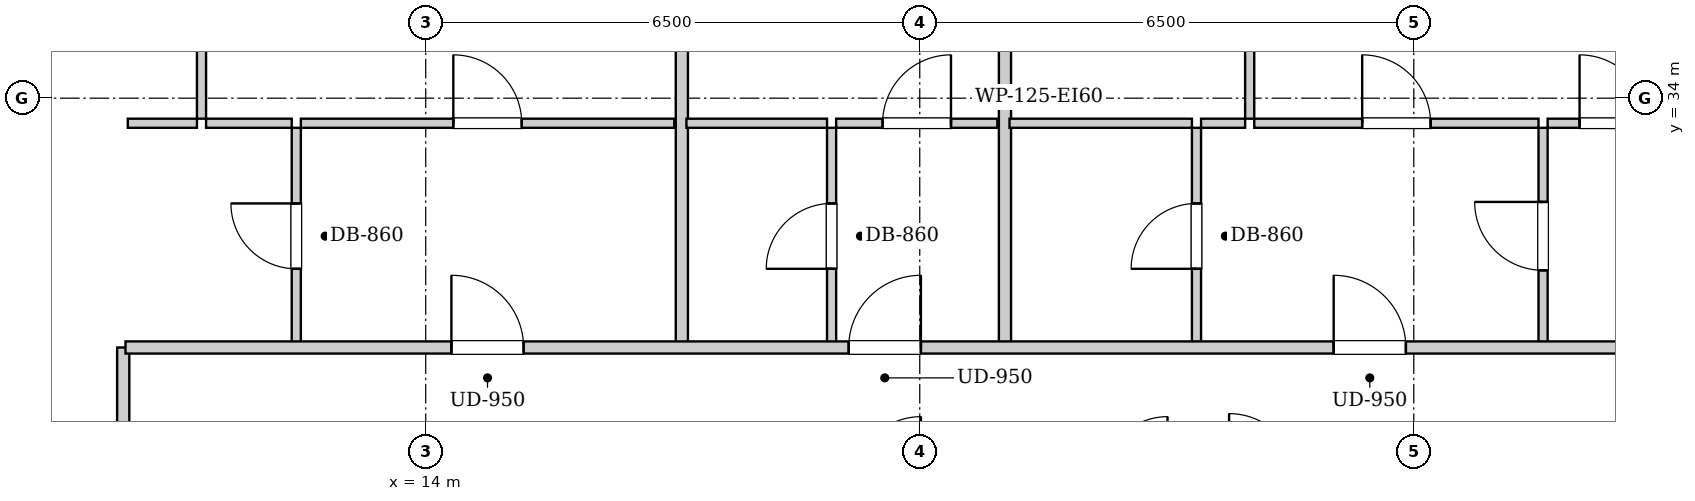
"""IFC4 building model, lengths in metres.
Left out: names, types, materials, properties, quantities, classifications, styles, units other than length and angle.
Written with IfcOpenShell. Run it as: python <this file> out.ifc"""

import sys

from ifc_helpers import new_model, si_unit, direction, frame, frame_2d, origin, place, context, subcontext, project, spatial, rectangle, extrude, element, fill, save


model = new_model("IFC4")
c1 = context("Model", 3, precision=1e-05, world=origin(), true_north=direction((0.0, 1.0)))
c2 = subcontext(c1, "Body", "Model", "MODEL_VIEW")
j1 = project(units=[si_unit("LENGTHUNIT", "METRE"), si_unit("PLANEANGLEUNIT", "RADIAN")], contexts=[c1])
p1 = place(None, origin())
s1 = spatial("IfcSite", under=j1, at=p1, CompositionType="ELEMENT")
p2 = place(p1, origin())
s2 = spatial("IfcBuilding", under=s1, at=p2, CompositionType="ELEMENT")
p3 = place(p2, frame((0.0, 0.0, 163.4)))
s3 = spatial("IfcBuildingStorey", under=s2, at=p3, CompositionType="ELEMENT", Elevation=163.4)
p4 = place(p3, frame((10.02, 28.98, 0.0), z_axis=(0.0, 0.0, 1.0), x_axis=(0.0, 1.0, 0.0)))
e1 = element("IfcWall", 1, at=p4, inside=s3, PredefinedType="PARTITIONING", context=c2, shape_type="SweptSolid", body=[
    extrude(rectangle(XDim=1.74, YDim=0.16, at=frame_2d((0.87, 0.0))), origin(), (0.0, 0.0, 1.0), 2.99),
])
p5 = place(p3, frame((12.297, 30.76, 0.0), z_axis=(0.0, 0.0, 1.0), x_axis=(0.0, 1.0, 0.0)))
e2 = element("IfcWall", 2, at=p5, inside=s3, PredefinedType="PARTITIONING", context=c2, shape_type="SweptSolid", body=[
    extrude(rectangle(XDim=2.85, YDim=0.12, at=frame_2d((1.425, 0.0))), origin(), (0.0, 0.0, 1.0), 2.99),
])
p6 = place(p5, frame((0.995, 0.0, 0.0)))
e3 = element("IfcOpeningElement", 3, at=p6, cuts=e2, PredefinedType="OPENING", context=c2, shape_type="SweptSolid", body=[
    extrude(rectangle(XDim=0.86, YDim=2.05, at=frame_2d((0.43, 1.025))), frame((0.0, 0.07, 0.0), z_axis=(0.0, -1.0, 0.0), x_axis=(1.0, 0.0, 0.0)), (0.0, 0.0, 1.0), 0.14),
])
p7 = place(p3, frame((10.08, 33.67, 0.0), z_axis=(0.0, 0.0, 1.0), x_axis=(1.0, 0.0, 0.0)))
e4 = element("IfcWall", 4, at=p7, inside=s3, PredefinedType="PARTITIONING", context=c2, shape_type="SweptSolid", body=[
    extrude(rectangle(XDim=0.91, YDim=0.12, at=frame_2d((0.455, 0.0))), origin(), (0.0, 0.0, 1.0), 2.99),
])
p8 = place(p3, frame((11.11, 33.67, 0.0), z_axis=(0.0, 0.0, 1.0), x_axis=(1.0, 0.0, 0.0)))
e5 = element("IfcWall", 5, at=p8, inside=s3, PredefinedType="PARTITIONING", context=c2, shape_type="SweptSolid", body=[
    extrude(rectangle(XDim=1.127, YDim=0.12, at=frame_2d((0.563, 0.0))), origin(), (0.0, 0.0, 1.0), 2.99),
])
p9 = place(p3, frame((12.357, 33.67, 0.0), z_axis=(0.0, 0.0, 1.0), x_axis=(1.0, 0.0, 0.0)))
e6 = element("IfcWall", 6, at=p9, inside=s3, PredefinedType="PARTITIONING", context=c2, shape_type="SweptSolid", body=[
    extrude(rectangle(XDim=4.913, YDim=0.12, at=frame_2d((2.457, 0.0))), origin(), (0.0, 0.0, 1.0), 2.99),
])
p10 = place(p9, frame((2.006, 0.0, 0.0)))
e7 = element("IfcOpeningElement", 7, at=p10, cuts=e6, PredefinedType="OPENING", context=c2, shape_type="SweptSolid", body=[
    extrude(rectangle(XDim=0.9, YDim=2.05, at=frame_2d((0.45, 1.025))), frame((0.0, 0.07, 0.0), z_axis=(0.0, -1.0, 0.0), x_axis=(1.0, 0.0, 0.0)), (0.0, 0.0, 1.0), 0.14),
])
p11 = place(p3, frame((11.05, 33.73, 0.0), z_axis=(0.0, 0.0, 1.0), x_axis=(0.0, 1.0, 0.0)))
e8 = element("IfcWall", 8, at=p11, inside=s3, PredefinedType="PARTITIONING", context=c2, shape_type="SweptSolid", body=[
    extrude(rectangle(XDim=9.29, YDim=0.12, at=frame_2d((4.645, 0.0))), origin(), (0.0, 0.0, 1.0), 2.99),
])
p12 = place(p11, frame((4.18, 0.0, 0.0)))
e9 = element("IfcOpeningElement", 9, at=p12, cuts=e8, PredefinedType="OPENING", context=c2, shape_type="SweptSolid", body=[
    extrude(rectangle(XDim=0.9, YDim=2.05, at=frame_2d((0.45, 1.025))), frame((0.0, 0.07, 0.0), z_axis=(0.0, -1.0, 0.0), x_axis=(1.0, 0.0, 0.0)), (0.0, 0.0, 1.0), 0.14),
])
p13 = place(p3, frame((17.37, 30.76, 0.0), z_axis=(0.0, 0.0, 1.0), x_axis=(0.0, 1.0, 0.0)))
e10 = element("IfcWall", 10, at=p13, inside=s3, PredefinedType="PARTITIONING", context=c2, shape_type="SweptSolid", body=[
    extrude(rectangle(XDim=12.26, YDim=0.16, at=frame_2d((6.13, 0.0))), origin(), (0.0, 0.0, 1.0), 2.99),
])
p14 = place(p3, frame((19.34, 30.76, 0.0), z_axis=(0.0, 0.0, 1.0), x_axis=(0.0, 1.0, 0.0)))
e11 = element("IfcWall", 11, at=p14, inside=s3, PredefinedType="PARTITIONING", context=c2, shape_type="SweptSolid", body=[
    extrude(rectangle(XDim=2.85, YDim=0.12, at=frame_2d((1.425, 0.0))), origin(), (0.0, 0.0, 1.0), 2.99),
])
p15 = place(p14, frame((0.995, 0.0, 0.0)))
e12 = element("IfcOpeningElement", 12, at=p15, cuts=e11, PredefinedType="OPENING", context=c2, shape_type="SweptSolid", body=[
    extrude(rectangle(XDim=0.86, YDim=2.05, at=frame_2d((0.43, 1.025))), frame((0.0, 0.07, 0.0), z_axis=(0.0, -1.0, 0.0), x_axis=(1.0, 0.0, 0.0)), (0.0, 0.0, 1.0), 0.14),
])
p16 = place(p3, frame((17.43, 33.67, 0.0), z_axis=(0.0, 0.0, 1.0), x_axis=(1.0, 0.0, 0.0)))
e13 = element("IfcWall", 13, at=p16, inside=s3, PredefinedType="PARTITIONING", context=c2, shape_type="SweptSolid", body=[
    extrude(rectangle(XDim=1.85, YDim=0.12, at=frame_2d((0.925, 0.0))), origin(), (0.0, 0.0, 1.0), 2.99),
])
p17 = place(p3, frame((19.4, 33.67, 0.0), z_axis=(0.0, 0.0, 1.0), x_axis=(1.0, 0.0, 0.0)))
e14 = element("IfcWall", 14, at=p17, inside=s3, PredefinedType="PARTITIONING", context=c2, shape_type="SweptSolid", body=[
    extrude(rectangle(XDim=2.121, YDim=0.12, at=frame_2d((1.061, 0.0))), origin(), (0.0, 0.0, 1.0), 2.99),
])
p18 = place(p17, frame((0.611, 0.0, 0.0)))
e15 = element("IfcOpeningElement", 15, at=p18, cuts=e14, PredefinedType="OPENING", context=c2, shape_type="SweptSolid", body=[
    extrude(rectangle(XDim=0.9, YDim=2.05, at=frame_2d((0.45, 1.025))), frame((0.0, 0.07, 0.0), z_axis=(0.0, -1.0, 0.0), x_axis=(1.0, 0.0, 0.0)), (0.0, 0.0, 1.0), 0.14),
])
p19 = place(p3, frame((21.621, 30.76, 0.0), z_axis=(0.0, 0.0, 1.0), x_axis=(0.0, 1.0, 0.0)))
e16 = element("IfcWall", 16, at=p19, inside=s3, PredefinedType="PARTITIONING", context=c2, shape_type="SweptSolid", body=[
    extrude(rectangle(XDim=12.26, YDim=0.16, at=frame_2d((6.13, 0.0))), origin(), (0.0, 0.0, 1.0), 2.99),
])
p20 = place(p3, frame((24.141, 30.76, 0.0), z_axis=(0.0, 0.0, 1.0), x_axis=(0.0, 1.0, 0.0)))
e17 = element("IfcWall", 17, at=p20, inside=s3, PredefinedType="PARTITIONING", context=c2, shape_type="SweptSolid", body=[
    extrude(rectangle(XDim=2.85, YDim=0.12, at=frame_2d((1.425, 0.0))), origin(), (0.0, 0.0, 1.0), 2.99),
])
p21 = place(p20, frame((0.995, 0.0, 0.0)))
e18 = element("IfcOpeningElement", 18, at=p21, cuts=e17, PredefinedType="OPENING", context=c2, shape_type="SweptSolid", body=[
    extrude(rectangle(XDim=0.86, YDim=2.05, at=frame_2d((0.43, 1.025))), frame((0.0, 0.07, 0.0), z_axis=(0.0, -1.0, 0.0), x_axis=(1.0, 0.0, 0.0)), (0.0, 0.0, 1.0), 0.14),
])
p22 = place(p3, frame((21.681, 33.67, 0.0), z_axis=(0.0, 0.0, 1.0), x_axis=(1.0, 0.0, 0.0)))
e19 = element("IfcWall", 19, at=p22, inside=s3, PredefinedType="PARTITIONING", context=c2, shape_type="SweptSolid", body=[
    extrude(rectangle(XDim=2.4, YDim=0.12, at=frame_2d((1.2, 0.0))), origin(), (0.0, 0.0, 1.0), 2.99),
])
p23 = place(p3, frame((28.701, 30.76, 0.0), z_axis=(0.0, 0.0, 1.0), x_axis=(0.0, 1.0, 0.0)))
e20 = element("IfcWall", 20, at=p23, inside=s3, PredefinedType="PARTITIONING", context=c2, shape_type="SweptSolid", body=[
    extrude(rectangle(XDim=2.85, YDim=0.12, at=frame_2d((1.425, 0.0))), origin(), (0.0, 0.0, 1.0), 2.99),
])
p24 = place(p23, frame((0.975, 0.0, 0.0)))
e21 = element("IfcOpeningElement", 21, at=p24, cuts=e20, PredefinedType="OPENING", context=c2, shape_type="SweptSolid", body=[
    extrude(rectangle(XDim=0.9, YDim=2.05, at=frame_2d((0.45, 1.025))), frame((0.0, 0.07, 0.0), z_axis=(0.0, -1.0, 0.0), x_axis=(1.0, 0.0, 0.0)), (0.0, 0.0, 1.0), 0.14),
])
p25 = place(p3, frame((24.201, 33.67, 0.0), z_axis=(0.0, 0.0, 1.0), x_axis=(1.0, 0.0, 0.0)))
e22 = element("IfcWall", 22, at=p25, inside=s3, PredefinedType="PARTITIONING", context=c2, shape_type="SweptSolid", body=[
    extrude(rectangle(XDim=0.58, YDim=0.12, at=frame_2d((0.29, 0.0))), origin(), (0.0, 0.0, 1.0), 2.99),
])
p26 = place(p3, frame((24.901, 33.67, 0.0), z_axis=(0.0, 0.0, 1.0), x_axis=(1.0, 0.0, 0.0)))
e23 = element("IfcWall", 23, at=p26, inside=s3, PredefinedType="PARTITIONING", context=c2, shape_type="SweptSolid", body=[
    extrude(rectangle(XDim=3.74, YDim=0.12, at=frame_2d((1.87, 0.0))), origin(), (0.0, 0.0, 1.0), 2.99),
])
p27 = place(p26, frame((1.42, 0.0, 0.0)))
e24 = element("IfcOpeningElement", 24, at=p27, cuts=e23, PredefinedType="OPENING", context=c2, shape_type="SweptSolid", body=[
    extrude(rectangle(XDim=0.9, YDim=2.05, at=frame_2d((0.45, 1.025))), frame((0.0, 0.07, 0.0), z_axis=(0.0, -1.0, 0.0), x_axis=(1.0, 0.0, 0.0)), (0.0, 0.0, 1.0), 0.14),
])
p28 = place(p3, frame((28.761, 33.67, 0.0), z_axis=(0.0, 0.0, 1.0), x_axis=(1.0, 0.0, 0.0)))
e25 = element("IfcWall", 25, at=p28, inside=s3, PredefinedType="PARTITIONING", context=c2, shape_type="SweptSolid", body=[
    extrude(rectangle(XDim=1.739, YDim=0.12, at=frame_2d((0.87, 0.0))), origin(), (0.0, 0.0, 1.0), 2.99),
])
p29 = place(p28, frame((0.42, 0.0, 0.0)))
e26 = element("IfcOpeningElement", 26, at=p29, cuts=e25, PredefinedType="OPENING", context=c2, shape_type="SweptSolid", body=[
    extrude(rectangle(XDim=0.9, YDim=2.05, at=frame_2d((0.45, 1.025))), frame((0.0, 0.07, 0.0), z_axis=(0.0, -1.0, 0.0), x_axis=(1.0, 0.0, 0.0)), (0.0, 0.0, 1.0), 0.14),
])
p30 = place(p3, frame((24.841, 33.73, 0.0), z_axis=(0.0, 0.0, 1.0), x_axis=(0.0, 1.0, 0.0)))
e27 = element("IfcWall", 27, at=p30, inside=s3, PredefinedType="PARTITIONING", context=c2, shape_type="SweptSolid", body=[
    extrude(rectangle(XDim=9.29, YDim=0.12, at=frame_2d((4.645, 0.0))), origin(), (0.0, 0.0, 1.0), 2.99),
])
p31 = place(p30, frame((4.18, 0.0, 0.0)))
e28 = element("IfcOpeningElement", 28, at=p31, cuts=e27, PredefinedType="OPENING", context=c2, shape_type="SweptSolid", body=[
    extrude(rectangle(XDim=0.9, YDim=2.05, at=frame_2d((0.45, 1.025))), frame((0.0, 0.07, 0.0), z_axis=(0.0, -1.0, 0.0), x_axis=(1.0, 0.0, 0.0)), (0.0, 0.0, 1.0), 0.14),
])
p32 = place(p3, frame((10.05, 30.72, 0.0), z_axis=(0.0, 0.0, 1.0), x_axis=(1.0, 0.0, 0.0)))
e29 = element("IfcWall", 29, at=p32, inside=s3, PredefinedType="PARTITIONING", context=c2, shape_type="SweptSolid", body=[
    extrude(rectangle(XDim=27.7, YDim=0.16, at=frame_2d((13.85, 0.0))), origin(), (0.0, 0.0, 1.0), 2.99),
])
p33 = place(p32, frame((4.288, 0.0, 0.0)))
e30 = element("IfcOpeningElement", 30, at=p33, cuts=e29, PredefinedType="OPENING", context=c2, shape_type="SweptSolid", body=[
    extrude(rectangle(XDim=0.95, YDim=2.1, at=frame_2d((0.475, 1.05))), frame((0.0, 0.09, 0.0), z_axis=(0.0, -1.0, 0.0), x_axis=(1.0, 0.0, 0.0)), (0.0, 0.0, 1.0), 0.18),
])
p34 = place(p32, frame((9.515, 0.0, 0.0)))
e31 = element("IfcOpeningElement", 31, at=p34, cuts=e29, PredefinedType="OPENING", context=c2, shape_type="SweptSolid", body=[
    extrude(rectangle(XDim=0.95, YDim=2.1, at=frame_2d((0.475, 1.05))), frame((0.0, 0.09, 0.0), z_axis=(0.0, -1.0, 0.0), x_axis=(1.0, 0.0, 0.0)), (0.0, 0.0, 1.0), 0.18),
])
p35 = place(p32, frame((15.896, 0.0, 0.0)))
e32 = element("IfcOpeningElement", 32, at=p35, cuts=e29, PredefinedType="OPENING", context=c2, shape_type="SweptSolid", body=[
    extrude(rectangle(XDim=0.95, YDim=2.1, at=frame_2d((0.475, 1.05))), frame((0.0, 0.09, 0.0), z_axis=(0.0, -1.0, 0.0), x_axis=(1.0, 0.0, 0.0)), (0.0, 0.0, 1.0), 0.18),
])
p36 = place(p32, frame((25.925, 0.0, 0.0)))
e33 = element("IfcOpeningElement", 33, at=p36, cuts=e29, PredefinedType="OPENING", context=c2, shape_type="SweptSolid", body=[
    extrude(rectangle(XDim=0.95, YDim=2.1, at=frame_2d((0.475, 1.05))), frame((0.0, 0.09, 0.0), z_axis=(0.0, -1.0, 0.0), x_axis=(1.0, 0.0, 0.0)), (0.0, 0.0, 1.0), 0.18),
])
p37 = place(p6, origin())
e34 = element("IfcDoor", 34, at=p37, inside=s3, OperationType="SINGLE_SWING_RIGHT", PredefinedType="DOOR", context=c2, shape_type="SweptSolid", body=[
    extrude(rectangle(XDim=0.86, YDim=2.05, at=frame_2d((0.43, 1.025))), frame((0.0, 0.025, 0.0), z_axis=(0.0, -1.0, 0.0), x_axis=(1.0, 0.0, 0.0)), (0.0, 0.0, 1.0), 0.05),
])
fill(e3, e34)
p38 = place(p10, origin())
e35 = element("IfcDoor", 35, at=p38, inside=s3, OperationType="SINGLE_SWING_LEFT", PredefinedType="DOOR", context=c2, shape_type="SweptSolid", body=[
    extrude(rectangle(XDim=0.9, YDim=2.05, at=frame_2d((0.45, 1.025))), frame((0.0, 0.025, 0.0), z_axis=(0.0, -1.0, 0.0), x_axis=(1.0, 0.0, 0.0)), (0.0, 0.0, 1.0), 0.05),
])
fill(e7, e35)
p39 = place(p15, origin())
e36 = element("IfcDoor", 36, at=p39, inside=s3, OperationType="SINGLE_SWING_LEFT", PredefinedType="DOOR", context=c2, shape_type="SweptSolid", body=[
    extrude(rectangle(XDim=0.86, YDim=2.05, at=frame_2d((0.43, 1.025))), frame((0.0, 0.025, 0.0), z_axis=(0.0, -1.0, 0.0), x_axis=(1.0, 0.0, 0.0)), (0.0, 0.0, 1.0), 0.05),
])
fill(e12, e36)
p40 = place(p18, origin())
e37 = element("IfcDoor", 37, at=p40, inside=s3, OperationType="SINGLE_SWING_RIGHT", PredefinedType="DOOR", context=c2, shape_type="SweptSolid", body=[
    extrude(rectangle(XDim=0.9, YDim=2.05, at=frame_2d((0.45, 1.025))), frame((0.0, 0.025, 0.0), z_axis=(0.0, -1.0, 0.0), x_axis=(1.0, 0.0, 0.0)), (0.0, 0.0, 1.0), 0.05),
])
fill(e15, e37)
p41 = place(p21, origin())
e38 = element("IfcDoor", 38, at=p41, inside=s3, OperationType="SINGLE_SWING_LEFT", PredefinedType="DOOR", context=c2, shape_type="SweptSolid", body=[
    extrude(rectangle(XDim=0.86, YDim=2.05, at=frame_2d((0.43, 1.025))), frame((0.0, 0.025, 0.0), z_axis=(0.0, -1.0, 0.0), x_axis=(1.0, 0.0, 0.0)), (0.0, 0.0, 1.0), 0.05),
])
fill(e18, e38)
p42 = place(p24, origin())
e39 = element("IfcDoor", 39, at=p42, inside=s3, OperationType="SINGLE_SWING_RIGHT", PredefinedType="DOOR", context=c2, shape_type="SweptSolid", body=[
    extrude(rectangle(XDim=0.9, YDim=2.05, at=frame_2d((0.45, 1.025))), frame((0.0, 0.025, 0.0), z_axis=(0.0, -1.0, 0.0), x_axis=(1.0, 0.0, 0.0)), (0.0, 0.0, 1.0), 0.05),
])
fill(e21, e39)
p43 = place(p27, origin())
e40 = element("IfcDoor", 40, at=p43, inside=s3, OperationType="SINGLE_SWING_LEFT", PredefinedType="DOOR", context=c2, shape_type="SweptSolid", body=[
    extrude(rectangle(XDim=0.9, YDim=2.05, at=frame_2d((0.45, 1.025))), frame((0.0, 0.025, 0.0), z_axis=(0.0, -1.0, 0.0), x_axis=(1.0, 0.0, 0.0)), (0.0, 0.0, 1.0), 0.05),
])
fill(e24, e40)
p44 = place(p29, origin())
e41 = element("IfcDoor", 41, at=p44, inside=s3, OperationType="SINGLE_SWING_LEFT", PredefinedType="DOOR", context=c2, shape_type="SweptSolid", body=[
    extrude(rectangle(XDim=0.9, YDim=2.05, at=frame_2d((0.45, 1.025))), frame((0.0, 0.025, 0.0), z_axis=(0.0, -1.0, 0.0), x_axis=(1.0, 0.0, 0.0)), (0.0, 0.0, 1.0), 0.05),
])
fill(e26, e41)
p45 = place(p33, origin())
e42 = element("IfcDoor", 42, at=p45, inside=s3, OperationType="SINGLE_SWING_LEFT", PredefinedType="DOOR", context=c2, shape_type="SweptSolid", body=[
    extrude(rectangle(XDim=0.95, YDim=2.1, at=frame_2d((0.475, 1.05))), frame((0.0, 0.025, 0.0), z_axis=(0.0, -1.0, 0.0), x_axis=(1.0, 0.0, 0.0)), (0.0, 0.0, 1.0), 0.05),
])
fill(e30, e42)
p46 = place(p34, origin())
e43 = element("IfcDoor", 43, at=p46, inside=s3, OperationType="SINGLE_SWING_RIGHT", PredefinedType="DOOR", context=c2, shape_type="SweptSolid", body=[
    extrude(rectangle(XDim=0.95, YDim=2.1, at=frame_2d((0.475, 1.05))), frame((0.0, 0.025, 0.0), z_axis=(0.0, -1.0, 0.0), x_axis=(1.0, 0.0, 0.0)), (0.0, 0.0, 1.0), 0.05),
])
fill(e31, e43)
p47 = place(p35, origin())
e44 = element("IfcDoor", 44, at=p47, inside=s3, OperationType="SINGLE_SWING_LEFT", PredefinedType="DOOR", context=c2, shape_type="SweptSolid", body=[
    extrude(rectangle(XDim=0.95, YDim=2.1, at=frame_2d((0.475, 1.05))), frame((0.0, 0.025, 0.0), z_axis=(0.0, -1.0, 0.0), x_axis=(1.0, 0.0, 0.0)), (0.0, 0.0, 1.0), 0.05),
])
fill(e32, e44)
save(model, sys.argv[1])
